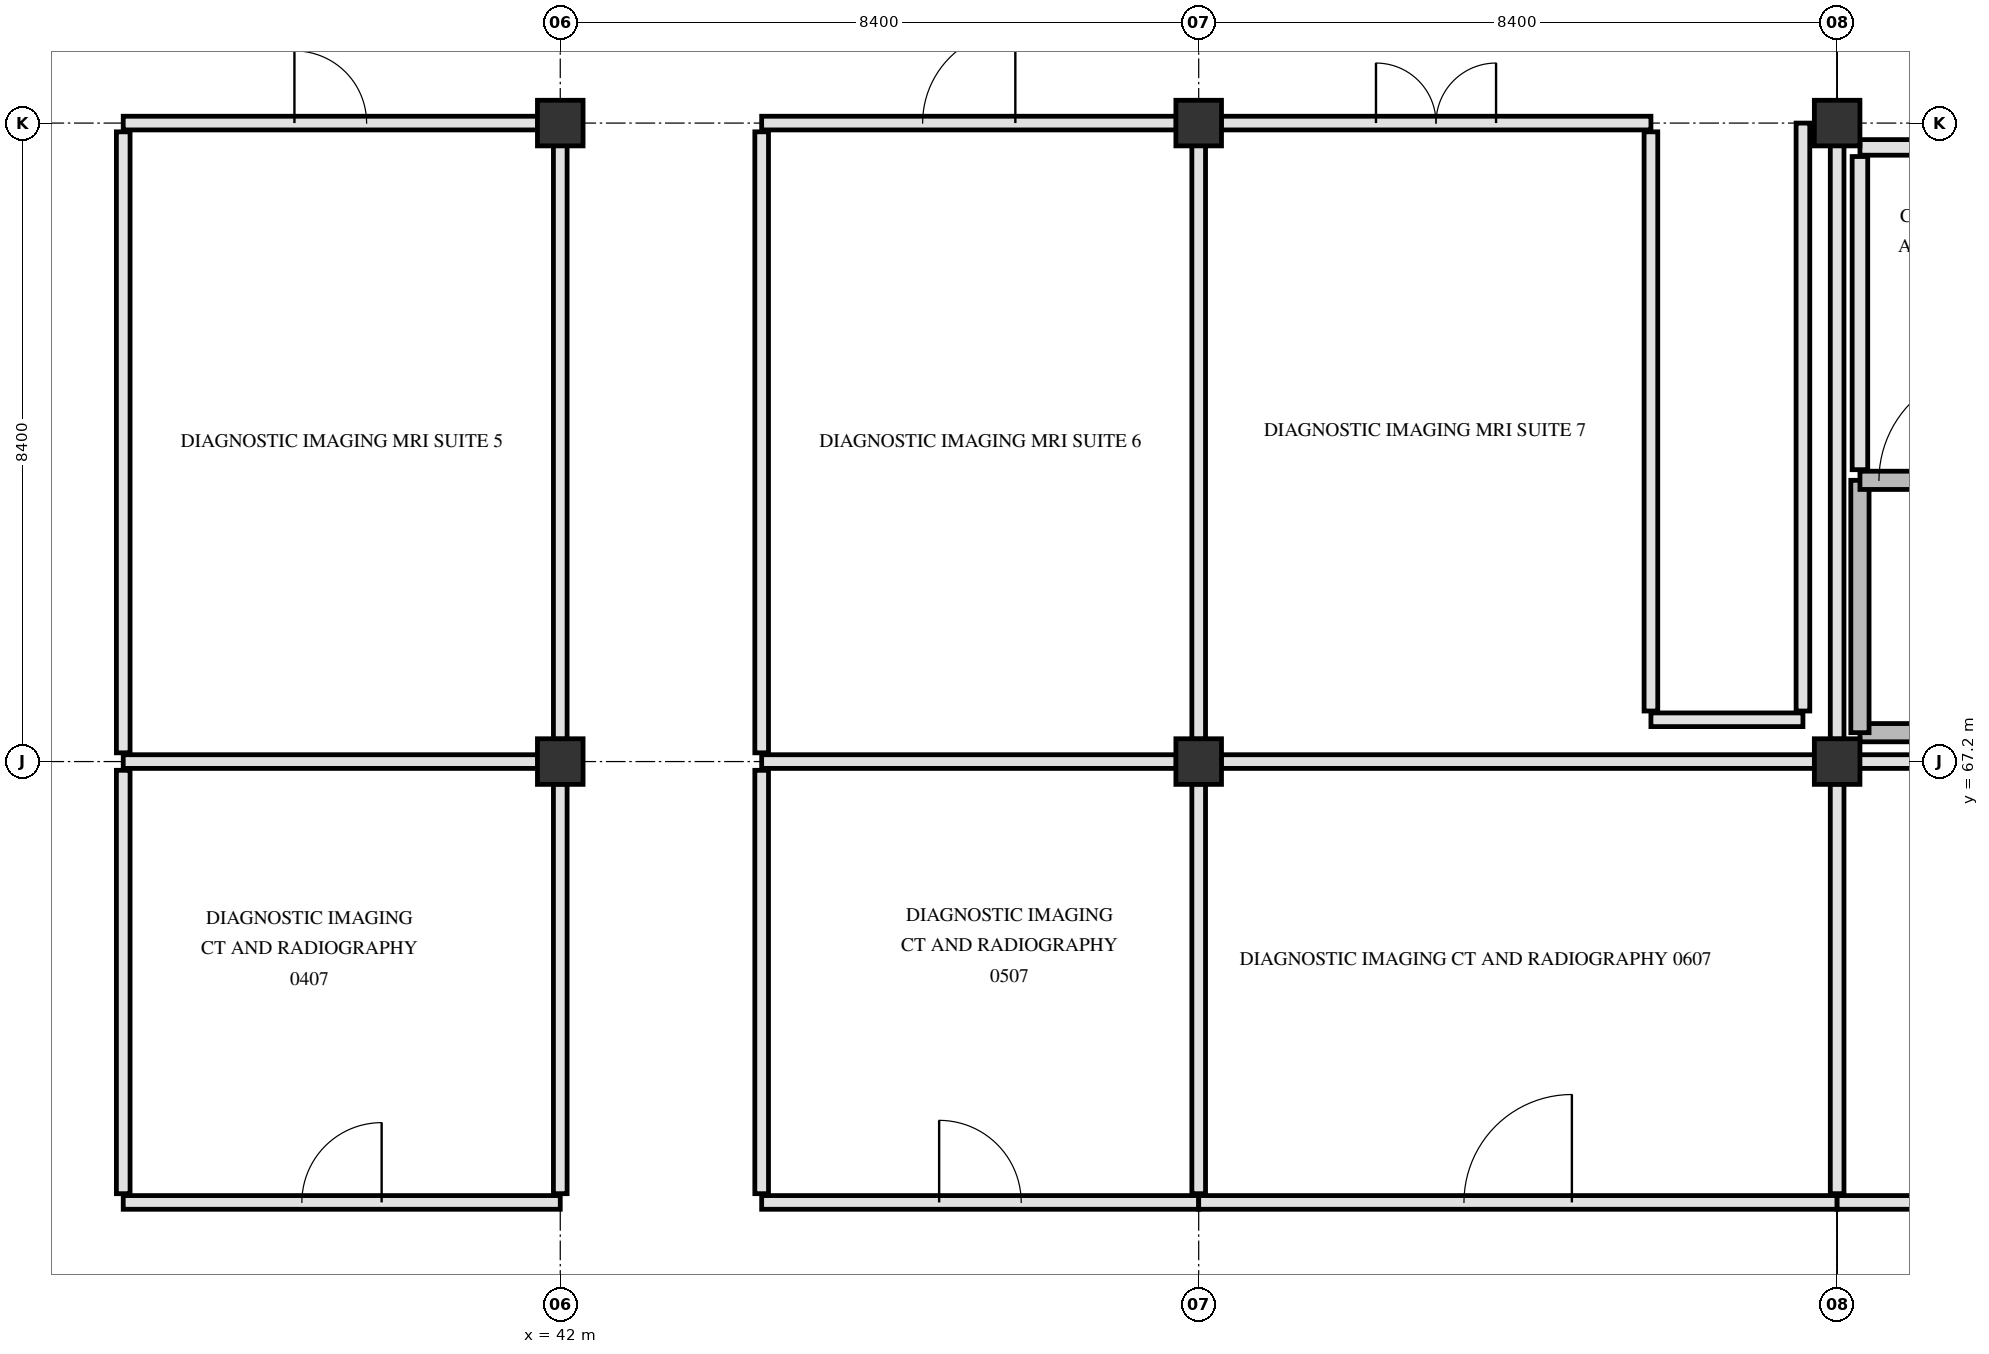
"""IFC4 building model, lengths in metres.
Left out: names, types, materials, properties, quantities, classifications, styles, units other than length and angle.
Written with IfcOpenShell. Run it as: python <this file> out.ifc"""

import sys

from ifc_helpers import new_model, si_unit, direction, frame, frame_2d, origin, origin_2d, place, context, subcontext, project, spatial, rectangle, extrude, element, fill, save


model = new_model("IFC4")
c1 = context("Model", 3, precision=1e-05, world=origin(), true_north=direction((0.0, 1.0)))
c2 = subcontext(c1, "Body", "Model", "MODEL_VIEW")
j1 = project(units=[si_unit("LENGTHUNIT", "METRE"), si_unit("PLANEANGLEUNIT", "RADIAN")], contexts=[c1])
p1 = place(None, origin())
s1 = spatial("IfcSite", under=j1, at=p1, CompositionType="ELEMENT")
p2 = place(p1, origin())
s2 = spatial("IfcBuilding", under=s1, at=p2, CompositionType="ELEMENT")
p3 = place(p2, origin())
s3 = spatial("IfcBuildingStorey", under=s2, at=p3, CompositionType="ELEMENT", Elevation=0.0)
for number, where, z_axis, x_axis in (
    (1, (42.0, 67.2, 0.0), (0.0, 0.0, 1.0), (1.0, 0.0, 0.0)),
    (2, (42.0, 75.6, 0.0), (0.0, 0.0, 1.0), (1.0, 0.0, 0.0)),
    (3, (50.4, 67.2, 0.0), (0.0, 0.0, 1.0), (1.0, 0.0, 0.0)),
    (4, (50.4, 75.6, 0.0), (0.0, 0.0, 1.0), (1.0, 0.0, 0.0)),
    (5, (58.8, 67.2, 0.0), (0.0, 0.0, 1.0), (1.0, 0.0, 0.0)),
    (6, (58.8, 75.6, 0.0), (0.0, 0.0, 1.0), (1.0, 0.0, 0.0)),
):
    element("IfcColumn", number, at=place(p3, frame(where, z_axis=z_axis, x_axis=x_axis)), inside=s3, PredefinedType="COLUMN", context=c2, shape_type="SweptSolid", body=[
        extrude(rectangle(XDim=0.6, YDim=0.6, at=origin_2d()), origin(), (0.0, 0.0, 1.0), 4.8),
    ])
p4 = place(p3, frame((59.1, 67.58, 0.0), z_axis=(0.0, 0.0, 1.0), x_axis=(1.0, 0.0, 0.0)))
e7 = element("IfcWall", 7, at=p4, inside=s3, PredefinedType="SHEAR", context=c2, shape_type="SweptSolid", body=[
    extrude(rectangle(XDim=7.82, YDim=0.24, at=frame_2d((3.91, 0.0))), origin(), (0.0, 0.0, 1.0), 4.5),
])
p5 = place(p3, frame((59.1, 67.58, 0.0), z_axis=(0.0, 0.0, 1.0), x_axis=(0.0, 1.0, 0.0)))
e8 = element("IfcWall", 8, at=p5, inside=s3, PredefinedType="SHEAR", context=c2, shape_type="SweptSolid", body=[
    extrude(rectangle(XDim=3.32, YDim=0.24, at=frame_2d((1.66, 0.0))), origin(), (0.0, 0.0, 1.0), 4.5),
])
p6 = place(p3, frame((59.1, 70.9, 0.0), z_axis=(0.0, 0.0, 1.0), x_axis=(1.0, 0.0, 0.0)))
e9 = element("IfcWall", 9, at=p6, inside=s3, PredefinedType="SHEAR", context=c2, shape_type="SweptSolid", body=[
    extrude(rectangle(XDim=7.82, YDim=0.24, at=frame_2d((3.91, 0.0))), origin(), (0.0, 0.0, 1.0), 4.5),
])
p7 = place(p6, frame((0.25, 0.0, 0.0)))
e10 = element("IfcOpeningElement", 10, at=p7, cuts=e9, PredefinedType="OPENING", context=c2, shape_type="SweptSolid", body=[
    extrude(rectangle(XDim=1.45, YDim=2.2, at=frame_2d((0.725, 1.1))), frame((0.0, 0.13, 0.0), z_axis=(0.0, -1.0, 0.0), x_axis=(1.0, 0.0, 0.0)), (0.0, 0.0, 1.0), 0.26),
])
p8 = place(p3, frame((59.1, 71.04, 0.0), z_axis=(0.0, 0.0, 1.0), x_axis=(0.0, 1.0, 0.0)))
e11 = element("IfcWall", 11, at=p8, inside=s3, PredefinedType="PARTITIONING", context=c2, shape_type="SweptSolid", body=[
    extrude(rectangle(XDim=4.12, YDim=0.205, at=frame_2d((2.06, 0.0))), origin(), (0.0, 0.0, 1.0), 3.89),
])
p9 = place(p3, frame((59.1, 75.28, 0.0), z_axis=(0.0, 0.0, 1.0), x_axis=(1.0, 0.0, 0.0)))
e12 = element("IfcWall", 12, at=p9, inside=s3, PredefinedType="PARTITIONING", context=c2, shape_type="SweptSolid", body=[
    extrude(rectangle(XDim=4.18, YDim=0.205, at=frame_2d((2.09, 0.0))), origin(), (0.0, 0.0, 1.0), 3.84),
])
p10 = place(p9, frame((1.29, 0.0, 0.0)))
e13 = element("IfcOpeningElement", 13, at=p10, cuts=e12, PredefinedType="OPENING", context=c2, shape_type="SweptSolid", body=[
    extrude(rectangle(XDim=1.6, YDim=2.25, at=frame_2d((0.8, 1.125))), frame((0.0, 0.113, 0.0), z_axis=(0.0, -1.0, 0.0), x_axis=(1.0, 0.0, 0.0)), (0.0, 0.0, 1.0), 0.225),
])
p11 = place(p3, frame((36.25, 61.4, 0.0), z_axis=(0.0, 0.0, 1.0), x_axis=(1.0, 0.0, 0.0)))
e14 = element("IfcWall", 14, at=p11, inside=s3, PredefinedType="PARTITIONING", context=c2, shape_type="SweptSolid", body=[
    extrude(rectangle(XDim=5.75, YDim=0.18, at=frame_2d((2.875, 0.0))), origin(), (0.0, 0.0, 1.0), 3.89),
])
p12 = place(p11, frame((2.35, 0.0, 0.0)))
e15 = element("IfcOpeningElement", 15, at=p12, cuts=e14, PredefinedType="OPENING", context=c2, shape_type="SweptSolid", body=[
    extrude(rectangle(XDim=1.05, YDim=2.15, at=frame_2d((0.525, 1.075))), frame((0.0, 0.1, 0.0), z_axis=(0.0, -1.0, 0.0), x_axis=(1.0, 0.0, 0.0)), (0.0, 0.0, 1.0), 0.2),
])
p13 = place(p3, frame((44.65, 61.4, 0.0), z_axis=(0.0, 0.0, 1.0), x_axis=(1.0, 0.0, 0.0)))
e16 = element("IfcWall", 16, at=p13, inside=s3, PredefinedType="PARTITIONING", context=c2, shape_type="SweptSolid", body=[
    extrude(rectangle(XDim=5.75, YDim=0.18, at=frame_2d((2.875, 0.0))), origin(), (0.0, 0.0, 1.0), 3.89),
])
p14 = place(p13, frame((2.335, 0.0, 0.0)))
e17 = element("IfcOpeningElement", 17, at=p14, cuts=e16, PredefinedType="OPENING", context=c2, shape_type="SweptSolid", body=[
    extrude(rectangle(XDim=1.08, YDim=2.12, at=frame_2d((0.54, 1.06))), frame((0.0, 0.1, 0.0), z_axis=(0.0, -1.0, 0.0), x_axis=(1.0, 0.0, 0.0)), (0.0, 0.0, 1.0), 0.2),
])
p15 = place(p3, frame((50.4, 61.4, 0.0), z_axis=(0.0, 0.0, 1.0), x_axis=(1.0, 0.0, 0.0)))
e18 = element("IfcWall", 18, at=p15, inside=s3, PredefinedType="PARTITIONING", context=c2, shape_type="SweptSolid", body=[
    extrude(rectangle(XDim=8.4, YDim=0.18, at=frame_2d((4.2, 0.0))), origin(), (0.0, 0.0, 1.0), 3.89),
])
p16 = place(p15, frame((3.49, 0.0, 0.0)))
e19 = element("IfcOpeningElement", 19, at=p16, cuts=e18, PredefinedType="OPENING", context=c2, shape_type="SweptSolid", body=[
    extrude(rectangle(XDim=1.42, YDim=2.22, at=frame_2d((0.71, 1.11))), frame((0.0, 0.1, 0.0), z_axis=(0.0, -1.0, 0.0), x_axis=(1.0, 0.0, 0.0)), (0.0, 0.0, 1.0), 0.2),
])
p17 = place(p3, frame((58.8, 61.4, 0.0), z_axis=(0.0, 0.0, 1.0), x_axis=(1.0, 0.0, 0.0)))
e20 = element("IfcWall", 20, at=p17, inside=s3, PredefinedType="PARTITIONING", context=c2, shape_type="SweptSolid", body=[
    extrude(rectangle(XDim=8.4, YDim=0.18, at=frame_2d((4.2, 0.0))), origin(), (0.0, 0.0, 1.0), 3.89),
])
p18 = place(p17, frame((3.7, 0.0, 0.0)))
e21 = element("IfcOpeningElement", 21, at=p18, cuts=e20, PredefinedType="OPENING", context=c2, shape_type="SweptSolid", body=[
    extrude(rectangle(XDim=1.0, YDim=2.15, at=frame_2d((0.5, 1.075))), frame((0.0, 0.1, 0.0), z_axis=(0.0, -1.0, 0.0), x_axis=(1.0, 0.0, 0.0)), (0.0, 0.0, 1.0), 0.2),
])
for number, where, z_axis, x_axis in (
    (22, (36.25, 67.2, 0.0), (0.0, 0.0, 1.0), (1.0, 0.0, 0.0)),
    (23, (44.65, 67.2, 0.0), (0.0, 0.0, 1.0), (1.0, 0.0, 0.0)),
):
    element("IfcWall", number, at=place(p3, frame(where, z_axis=z_axis, x_axis=x_axis)), inside=s3, PredefinedType="PARTITIONING", context=c2, shape_type="SweptSolid", body=[
        extrude(rectangle(XDim=5.455, YDim=0.18, at=frame_2d((2.728, 0.0))), origin(), (0.0, 0.0, 1.0), 3.84),
    ])
p19 = place(p3, frame((50.695, 67.2, 0.0), z_axis=(0.0, 0.0, 1.0), x_axis=(1.0, 0.0, 0.0)))
e24 = element("IfcWall", 24, at=p19, inside=s3, PredefinedType="PARTITIONING", context=c2, shape_type="SweptSolid", body=[
    extrude(rectangle(XDim=7.81, YDim=0.18, at=frame_2d((3.905, 0.0))), origin(), (0.0, 0.0, 1.0), 3.84),
])
p20 = place(p3, frame((59.095, 67.2, 0.0), z_axis=(0.0, 0.0, 1.0), x_axis=(1.0, 0.0, 0.0)))
e25 = element("IfcWall", 25, at=p20, inside=s3, PredefinedType="PARTITIONING", context=c2, shape_type="SweptSolid", body=[
    extrude(rectangle(XDim=7.81, YDim=0.18, at=frame_2d((3.905, 0.0))), origin(), (0.0, 0.0, 1.0), 3.84),
])
p21 = place(p3, frame((56.35, 67.75, 0.0), z_axis=(0.0, 0.0, 1.0), x_axis=(1.0, 0.0, 0.0)))
e26 = element("IfcWall", 26, at=p21, inside=s3, PredefinedType="PARTITIONING", context=c2, shape_type="SweptSolid", body=[
    extrude(rectangle(XDim=2.0, YDim=0.18, at=frame_2d((1.0, 0.0))), origin(), (0.0, 0.0, 1.0), 4.49),
])
p22 = place(p3, frame((36.25, 75.6, 0.0), z_axis=(0.0, 0.0, 1.0), x_axis=(1.0, 0.0, 0.0)))
e27 = element("IfcWall", 27, at=p22, inside=s3, PredefinedType="PARTITIONING", context=c2, shape_type="SweptSolid", body=[
    extrude(rectangle(XDim=5.455, YDim=0.18, at=frame_2d((2.728, 0.0))), origin(), (0.0, 0.0, 1.0), 3.84),
])
p23 = place(p22, frame((2.252, 0.0, 0.0)))
e28 = element("IfcOpeningElement", 28, at=p23, cuts=e27, PredefinedType="OPENING", context=c2, shape_type="SweptSolid", body=[
    extrude(rectangle(XDim=0.95, YDim=2.1, at=frame_2d((0.475, 1.05))), frame((0.0, 0.1, 0.0), z_axis=(0.0, -1.0, 0.0), x_axis=(1.0, 0.0, 0.0)), (0.0, 0.0, 1.0), 0.2),
])
p24 = place(p3, frame((44.65, 75.6, 0.0), z_axis=(0.0, 0.0, 1.0), x_axis=(1.0, 0.0, 0.0)))
e29 = element("IfcWall", 29, at=p24, inside=s3, PredefinedType="PARTITIONING", context=c2, shape_type="SweptSolid", body=[
    extrude(rectangle(XDim=5.455, YDim=0.18, at=frame_2d((2.728, 0.0))), origin(), (0.0, 0.0, 1.0), 3.84),
])
p25 = place(p24, frame((2.117, 0.0, 0.0)))
e30 = element("IfcOpeningElement", 30, at=p25, cuts=e29, PredefinedType="OPENING", context=c2, shape_type="SweptSolid", body=[
    extrude(rectangle(XDim=1.22, YDim=2.18, at=frame_2d((0.61, 1.09))), frame((0.0, 0.1, 0.0), z_axis=(0.0, -1.0, 0.0), x_axis=(1.0, 0.0, 0.0)), (0.0, 0.0, 1.0), 0.2),
])
p26 = place(p3, frame((50.695, 75.6, 0.0), z_axis=(0.0, 0.0, 1.0), x_axis=(1.0, 0.0, 0.0)))
e31 = element("IfcWall", 31, at=p26, inside=s3, PredefinedType="PARTITIONING", context=c2, shape_type="SweptSolid", body=[
    extrude(rectangle(XDim=5.655, YDim=0.18, at=frame_2d((2.828, 0.0))), origin(), (0.0, 0.0, 1.0), 3.84),
])
p27 = place(p26, frame((2.038, 0.0, 0.0)))
e32 = element("IfcOpeningElement", 32, at=p27, cuts=e31, PredefinedType="OPENING", context=c2, shape_type="SweptSolid", body=[
    extrude(rectangle(XDim=1.58, YDim=2.22, at=frame_2d((0.79, 1.11))), frame((0.0, 0.1, 0.0), z_axis=(0.0, -1.0, 0.0), x_axis=(1.0, 0.0, 0.0)), (0.0, 0.0, 1.0), 0.2),
])
p28 = place(p3, frame((36.25, 61.515, 0.0), z_axis=(0.0, 0.0, 1.0), x_axis=(0.0, 1.0, 0.0)))
e33 = element("IfcWall", 33, at=p28, inside=s3, PredefinedType="PARTITIONING", context=c2, shape_type="SweptSolid", body=[
    extrude(rectangle(XDim=5.57, YDim=0.18, at=frame_2d((2.785, 0.0))), origin(), (0.0, 0.0, 1.0), 3.84),
])
p29 = place(p3, frame((36.25, 67.315, 0.0), z_axis=(0.0, 0.0, 1.0), x_axis=(0.0, 1.0, 0.0)))
e34 = element("IfcWall", 34, at=p29, inside=s3, PredefinedType="PARTITIONING", context=c2, shape_type="SweptSolid", body=[
    extrude(rectangle(XDim=8.17, YDim=0.18, at=frame_2d((4.085, 0.0))), origin(), (0.0, 0.0, 1.0), 3.84),
])
p30 = place(p3, frame((42.0, 61.515, 0.0), z_axis=(0.0, 0.0, 1.0), x_axis=(0.0, 1.0, 0.0)))
e35 = element("IfcWall", 35, at=p30, inside=s3, PredefinedType="PARTITIONING", context=c2, shape_type="SweptSolid", body=[
    extrude(rectangle(XDim=5.39, YDim=0.18, at=frame_2d((2.695, 0.0))), origin(), (0.0, 0.0, 1.0), 3.89),
])
p31 = place(p3, frame((42.0, 67.495, 0.0), z_axis=(0.0, 0.0, 1.0), x_axis=(0.0, 1.0, 0.0)))
e36 = element("IfcWall", 36, at=p31, inside=s3, PredefinedType="PARTITIONING", context=c2, shape_type="SweptSolid", body=[
    extrude(rectangle(XDim=7.81, YDim=0.18, at=frame_2d((3.905, 0.0))), origin(), (0.0, 0.0, 1.0), 3.89),
])
p32 = place(p3, frame((44.65, 61.515, 0.0), z_axis=(0.0, 0.0, 1.0), x_axis=(0.0, 1.0, 0.0)))
e37 = element("IfcWall", 37, at=p32, inside=s3, PredefinedType="PARTITIONING", context=c2, shape_type="SweptSolid", body=[
    extrude(rectangle(XDim=5.57, YDim=0.18, at=frame_2d((2.785, 0.0))), origin(), (0.0, 0.0, 1.0), 3.84),
])
p33 = place(p3, frame((44.65, 67.315, 0.0), z_axis=(0.0, 0.0, 1.0), x_axis=(0.0, 1.0, 0.0)))
e38 = element("IfcWall", 38, at=p33, inside=s3, PredefinedType="PARTITIONING", context=c2, shape_type="SweptSolid", body=[
    extrude(rectangle(XDim=8.17, YDim=0.18, at=frame_2d((4.085, 0.0))), origin(), (0.0, 0.0, 1.0), 3.84),
])
p34 = place(p3, frame((50.4, 61.515, 0.0), z_axis=(0.0, 0.0, 1.0), x_axis=(0.0, 1.0, 0.0)))
e39 = element("IfcWall", 39, at=p34, inside=s3, PredefinedType="PARTITIONING", context=c2, shape_type="SweptSolid", body=[
    extrude(rectangle(XDim=5.39, YDim=0.18, at=frame_2d((2.695, 0.0))), origin(), (0.0, 0.0, 1.0), 3.89),
])
p35 = place(p3, frame((50.4, 67.495, 0.0), z_axis=(0.0, 0.0, 1.0), x_axis=(0.0, 1.0, 0.0)))
e40 = element("IfcWall", 40, at=p35, inside=s3, PredefinedType="PARTITIONING", context=c2, shape_type="SweptSolid", body=[
    extrude(rectangle(XDim=7.81, YDim=0.18, at=frame_2d((3.905, 0.0))), origin(), (0.0, 0.0, 1.0), 3.89),
])
p36 = place(p3, frame((56.35, 67.865, 0.0), z_axis=(0.0, 0.0, 1.0), x_axis=(0.0, 1.0, 0.0)))
e41 = element("IfcWall", 41, at=p36, inside=s3, PredefinedType="PARTITIONING", context=c2, shape_type="SweptSolid", body=[
    extrude(rectangle(XDim=7.62, YDim=0.18, at=frame_2d((3.81, 0.0))), origin(), (0.0, 0.0, 1.0), 3.84),
])
p37 = place(p3, frame((58.35, 67.865, 0.0), z_axis=(0.0, 0.0, 1.0), x_axis=(0.0, 1.0, 0.0)))
e42 = element("IfcWall", 42, at=p37, inside=s3, PredefinedType="PARTITIONING", context=c2, shape_type="SweptSolid", body=[
    extrude(rectangle(XDim=7.735, YDim=0.18, at=frame_2d((3.868, 0.0))), origin(), (0.0, 0.0, 1.0), 3.84),
])
p38 = place(p3, frame((58.8, 61.515, 0.0), z_axis=(0.0, 0.0, 1.0), x_axis=(0.0, 1.0, 0.0)))
e43 = element("IfcWall", 43, at=p38, inside=s3, PredefinedType="PARTITIONING", context=c2, shape_type="SweptSolid", body=[
    extrude(rectangle(XDim=5.39, YDim=0.18, at=frame_2d((2.695, 0.0))), origin(), (0.0, 0.0, 1.0), 3.89),
])
p39 = place(p3, frame((58.8, 67.495, 0.0), z_axis=(0.0, 0.0, 1.0), x_axis=(0.0, 1.0, 0.0)))
e44 = element("IfcWall", 44, at=p39, inside=s3, PredefinedType="PARTITIONING", context=c2, shape_type="SweptSolid", body=[
    extrude(rectangle(XDim=7.81, YDim=0.18, at=frame_2d((3.905, 0.0))), origin(), (0.0, 0.0, 1.0), 3.89),
])
p40 = place(p7, origin())
e45 = element("IfcDoor", 45, at=p40, inside=s3, OperationType="SINGLE_SWING_RIGHT", PredefinedType="DOOR", context=c2, shape_type="SweptSolid", body=[
    extrude(rectangle(XDim=1.45, YDim=2.2, at=frame_2d((0.725, 1.1))), frame((0.0, 0.025, 0.0), z_axis=(0.0, -1.0, 0.0), x_axis=(1.0, 0.0, 0.0)), (0.0, 0.0, 1.0), 0.05),
])
fill(e10, e45)
p41 = place(p12, origin())
e46 = element("IfcDoor", 46, at=p41, inside=s3, OperationType="SINGLE_SWING_RIGHT", PredefinedType="DOOR", context=c2, shape_type="SweptSolid", body=[
    extrude(rectangle(XDim=1.05, YDim=2.15, at=frame_2d((0.525, 1.075))), frame((0.0, 0.025, 0.0), z_axis=(0.0, -1.0, 0.0), x_axis=(1.0, 0.0, 0.0)), (0.0, 0.0, 1.0), 0.05),
])
fill(e15, e46)
p42 = place(p23, origin())
e47 = element("IfcDoor", 47, at=p42, inside=s3, OperationType="SINGLE_SWING_LEFT", PredefinedType="DOOR", context=c2, shape_type="SweptSolid", body=[
    extrude(rectangle(XDim=0.95, YDim=2.1, at=frame_2d((0.475, 1.05))), frame((0.0, 0.025, 0.0), z_axis=(0.0, -1.0, 0.0), x_axis=(1.0, 0.0, 0.0)), (0.0, 0.0, 1.0), 0.05),
])
fill(e28, e47)
p43 = place(p14, origin())
e48 = element("IfcDoor", 48, at=p43, inside=s3, OperationType="SINGLE_SWING_LEFT", PredefinedType="DOOR", context=c2, shape_type="SweptSolid", body=[
    extrude(rectangle(XDim=1.08, YDim=2.12, at=frame_2d((0.54, 1.06))), frame((0.0, 0.025, 0.0), z_axis=(0.0, -1.0, 0.0), x_axis=(1.0, 0.0, 0.0)), (0.0, 0.0, 1.0), 0.05),
])
fill(e17, e48)
p44 = place(p25, origin())
e49 = element("IfcDoor", 49, at=p44, inside=s3, OperationType="SINGLE_SWING_RIGHT", PredefinedType="DOOR", context=c2, shape_type="SweptSolid", body=[
    extrude(rectangle(XDim=1.22, YDim=2.18, at=frame_2d((0.61, 1.09))), frame((0.0, 0.025, 0.0), z_axis=(0.0, -1.0, 0.0), x_axis=(1.0, 0.0, 0.0)), (0.0, 0.0, 1.0), 0.05),
])
fill(e30, e49)
p45 = place(p16, origin())
e50 = element("IfcDoor", 50, at=p45, inside=s3, OperationType="SINGLE_SWING_RIGHT", PredefinedType="DOOR", context=c2, shape_type="SweptSolid", body=[
    extrude(rectangle(XDim=1.42, YDim=2.22, at=frame_2d((0.71, 1.11))), frame((0.0, 0.025, 0.0), z_axis=(0.0, -1.0, 0.0), x_axis=(1.0, 0.0, 0.0)), (0.0, 0.0, 1.0), 0.05),
])
fill(e19, e50)
p46 = place(p27, origin())
e51 = element("IfcDoor", 51, at=p46, inside=s3, OperationType="DOUBLE_SWING_LEFT", PredefinedType="DOOR", context=c2, shape_type="SweptSolid", body=[
    extrude(rectangle(XDim=1.58, YDim=2.22, at=frame_2d((0.79, 1.11))), frame((0.0, 0.025, 0.0), z_axis=(0.0, -1.0, 0.0), x_axis=(1.0, 0.0, 0.0)), (0.0, 0.0, 1.0), 0.05),
])
fill(e32, e51)
save(model, sys.argv[1])
